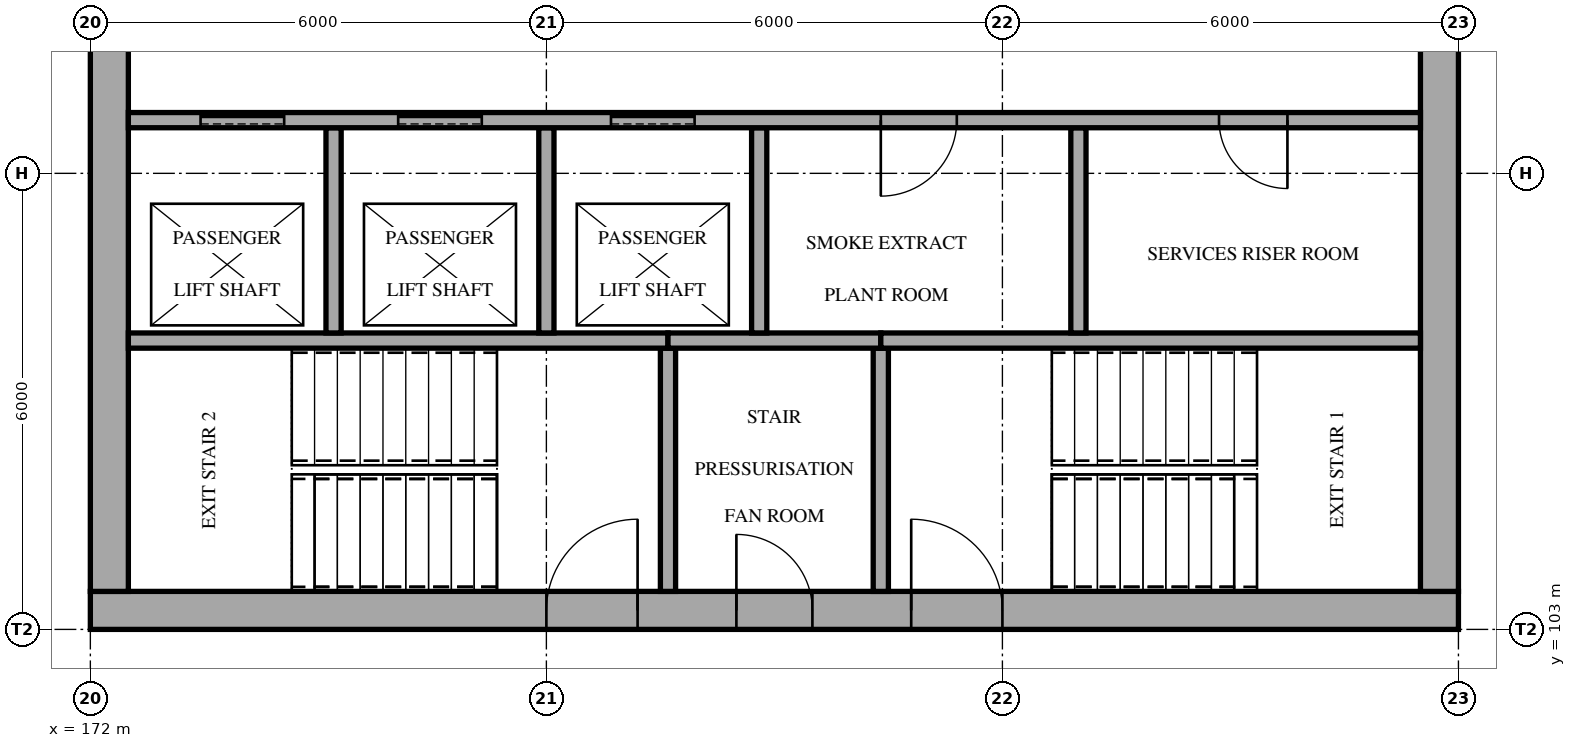
"""IFC4 building model, lengths in metres.
Left out: names, types, materials, properties, quantities, classifications, styles, units other than length and angle.
Written with IfcOpenShell. Run it as: python <this file> out.ifc"""

import sys

from ifc_helpers import new_model, si_unit, direction, frame, frame_2d, origin, place, context, subcontext, project, spatial, rectangle, extrude, element, fill, save


model = new_model("IFC4")
c1 = context("Model", 3, precision=1e-05, world=origin(), true_north=direction((0.0, 1.0)))
c2 = subcontext(c1, "Body", "Model", "MODEL_VIEW")
j1 = project(units=[si_unit("LENGTHUNIT", "METRE"), si_unit("PLANEANGLEUNIT", "RADIAN")], contexts=[c1])
p1 = place(None, origin())
s1 = spatial("IfcSite", under=j1, at=p1, CompositionType="ELEMENT")
p2 = place(p1, origin())
s2 = spatial("IfcBuilding", under=s1, at=p2, CompositionType="ELEMENT")
p3 = place(p2, frame((0.0, 0.0, -8.4)))
s3 = spatial("IfcBuildingStorey", under=s2, at=p3, CompositionType="ELEMENT", Elevation=-8.4)
p4 = place(p3, frame((172.0, 103.25, 0.0), z_axis=(0.0, 0.0, 1.0), x_axis=(1.0, 0.0, 0.0)))
e1 = element("IfcWall", 1, at=p4, inside=s3, PredefinedType="SHEAR", context=c2, shape_type="SweptSolid", body=[
    extrude(rectangle(XDim=18.0, YDim=0.5, at=frame_2d((9.0, 0.0))), origin(), (0.0, 0.0, 1.0), 4.2),
])
p5 = place(p4, frame((8.5, 0.0, 0.0)))
e2 = element("IfcOpeningElement", 2, at=p5, cuts=e1, PredefinedType="OPENING", context=c2, shape_type="SweptSolid", body=[
    extrude(rectangle(XDim=1.0, YDim=2.1, at=frame_2d((0.5, 1.05))), frame((0.0, 0.26, 0.0), z_axis=(0.0, -1.0, 0.0), x_axis=(1.0, 0.0, 0.0)), (0.0, 0.0, 1.0), 0.52),
])
p6 = place(p4, frame((6.0, 0.0, 0.0)))
e3 = element("IfcOpeningElement", 3, at=p6, cuts=e1, PredefinedType="OPENING", context=c2, shape_type="SweptSolid", body=[
    extrude(rectangle(XDim=1.2, YDim=2.1, at=frame_2d((0.6, 1.05))), frame((0.0, 0.26, 0.0), z_axis=(0.0, -1.0, 0.0), x_axis=(1.0, 0.0, 0.0)), (0.0, 0.0, 1.0), 0.52),
])
p7 = place(p4, frame((10.8, 0.0, 0.0)))
e4 = element("IfcOpeningElement", 4, at=p7, cuts=e1, PredefinedType="OPENING", context=c2, shape_type="SweptSolid", body=[
    extrude(rectangle(XDim=1.2, YDim=2.1, at=frame_2d((0.6, 1.05))), frame((0.0, 0.26, 0.0), z_axis=(0.0, -1.0, 0.0), x_axis=(1.0, 0.0, 0.0)), (0.0, 0.0, 1.0), 0.52),
])
p8 = place(p3, frame((172.25, 103.5, 0.0), z_axis=(0.0, 0.0, 1.0), x_axis=(0.0, 1.0, 0.0)))
e5 = element("IfcWall", 5, at=p8, inside=s3, PredefinedType="SHEAR", context=c2, shape_type="SweptSolid", body=[
    extrude(rectangle(XDim=17.0, YDim=0.5, at=frame_2d((8.5, 0.0))), origin(), (0.0, 0.0, 1.0), 4.2),
])
p9 = place(p8, frame((7.2, 0.0, 0.0)))
e6 = element("IfcOpeningElement", 6, at=p9, cuts=e5, PredefinedType="OPENING", context=c2, shape_type="SweptSolid", body=[
    extrude(rectangle(XDim=1.4, YDim=2.1, at=frame_2d((0.7, 1.05))), frame((0.0, 0.26, 0.0), z_axis=(0.0, -1.0, 0.0), x_axis=(1.0, 0.0, 0.0)), (0.0, 0.0, 1.0), 0.52),
])
p10 = place(p3, frame((189.75, 103.5, 0.0), z_axis=(0.0, 0.0, 1.0), x_axis=(0.0, 1.0, 0.0)))
e7 = element("IfcWall", 7, at=p10, inside=s3, PredefinedType="SHEAR", context=c2, shape_type="SweptSolid", body=[
    extrude(rectangle(XDim=17.0, YDim=0.5, at=frame_2d((8.5, 0.0))), origin(), (0.0, 0.0, 1.0), 4.2),
])
p11 = place(p10, frame((7.2, 0.0, 0.0)))
e8 = element("IfcOpeningElement", 8, at=p11, cuts=e7, PredefinedType="OPENING", context=c2, shape_type="SweptSolid", body=[
    extrude(rectangle(XDim=1.4, YDim=2.1, at=frame_2d((0.7, 1.05))), frame((0.0, 0.26, 0.0), z_axis=(0.0, -1.0, 0.0), x_axis=(1.0, 0.0, 0.0)), (0.0, 0.0, 1.0), 0.52),
])
for number, where, z_axis, x_axis in (
    (9, (179.6, 103.5, 0.0), (0.0, 0.0, 1.0), (0.0, 1.0, 0.0)),
    (10, (182.4, 103.5, 0.0), (0.0, 0.0, 1.0), (0.0, 1.0, 0.0)),
):
    element("IfcWall", number, at=place(p3, frame(where, z_axis=z_axis, x_axis=x_axis)), inside=s3, PredefinedType="SOLIDWALL", context=c2, shape_type="SweptSolid", body=[
        extrude(rectangle(XDim=3.2, YDim=0.2, at=frame_2d((1.6, 0.0))), origin(), (0.0, 0.0, 1.0), 3.85),
    ])
p12 = place(p3, frame((172.5, 106.8, 0.0), z_axis=(0.0, 0.0, 1.0), x_axis=(1.0, 0.0, 0.0)))
e11 = element("IfcWall", 11, at=p12, inside=s3, PredefinedType="SOLIDWALL", context=c2, shape_type="SweptSolid", body=[
    extrude(rectangle(XDim=7.1, YDim=0.2, at=frame_2d((3.55, 0.0))), origin(), (0.0, 0.0, 1.0), 3.85),
])
p13 = place(p3, frame((179.6, 106.8, 0.0), z_axis=(0.0, 0.0, 1.0), x_axis=(1.0, 0.0, 0.0)))
e12 = element("IfcWall", 12, at=p13, inside=s3, PredefinedType="SOLIDWALL", context=c2, shape_type="SweptSolid", body=[
    extrude(rectangle(XDim=2.8, YDim=0.2, at=frame_2d((1.4, 0.0))), origin(), (0.0, 0.0, 1.0), 3.85),
])
p14 = place(p3, frame((182.4, 106.8, 0.0), z_axis=(0.0, 0.0, 1.0), x_axis=(1.0, 0.0, 0.0)))
e13 = element("IfcWall", 13, at=p14, inside=s3, PredefinedType="SOLIDWALL", context=c2, shape_type="SweptSolid", body=[
    extrude(rectangle(XDim=7.1, YDim=0.2, at=frame_2d((3.55, 0.0))), origin(), (0.0, 0.0, 1.0), 3.85),
])
for number, where, z_axis, x_axis in (
    (14, (175.2, 106.9, 0.0), (0.0, 0.0, 1.0), (0.0, 1.0, 0.0)),
    (15, (178.0, 106.9, 0.0), (0.0, 0.0, 1.0), (0.0, 1.0, 0.0)),
    (16, (180.8, 106.9, 0.0), (0.0, 0.0, 1.0), (0.0, 1.0, 0.0)),
    (17, (185.0, 106.9, 0.0), (0.0, 0.0, 1.0), (0.0, 1.0, 0.0)),
):
    element("IfcWall", number, at=place(p3, frame(where, z_axis=z_axis, x_axis=x_axis)), inside=s3, PredefinedType="SOLIDWALL", context=c2, shape_type="SweptSolid", body=[
        extrude(rectangle(XDim=2.7, YDim=0.2, at=frame_2d((1.35, 0.0))), origin(), (0.0, 0.0, 1.0), 3.85),
    ])
p15 = place(p3, frame((172.5, 109.7, 0.0), z_axis=(0.0, 0.0, 1.0), x_axis=(1.0, 0.0, 0.0)))
e18 = element("IfcWall", 18, at=p15, inside=s3, PredefinedType="SOLIDWALL", context=c2, shape_type="SweptSolid", body=[
    extrude(rectangle(XDim=17.0, YDim=0.2, at=frame_2d((8.5, 0.0))), origin(), (0.0, 0.0, 1.0), 3.85),
])
p16 = place(p15, frame((0.95, 0.0, 0.0)))
e19 = element("IfcOpeningElement", 19, at=p16, cuts=e18, PredefinedType="OPENING", context=c2, shape_type="SweptSolid", body=[
    extrude(rectangle(XDim=1.1, YDim=2.1, at=frame_2d((0.55, 1.05))), frame((0.0, 0.11, 0.0), z_axis=(0.0, -1.0, 0.0), x_axis=(1.0, 0.0, 0.0)), (0.0, 0.0, 1.0), 0.22),
])
p17 = place(p15, frame((3.55, 0.0, 0.0)))
e20 = element("IfcOpeningElement", 20, at=p17, cuts=e18, PredefinedType="OPENING", context=c2, shape_type="SweptSolid", body=[
    extrude(rectangle(XDim=1.1, YDim=2.1, at=frame_2d((0.55, 1.05))), frame((0.0, 0.11, 0.0), z_axis=(0.0, -1.0, 0.0), x_axis=(1.0, 0.0, 0.0)), (0.0, 0.0, 1.0), 0.22),
])
p18 = place(p15, frame((6.35, 0.0, 0.0)))
e21 = element("IfcOpeningElement", 21, at=p18, cuts=e18, PredefinedType="OPENING", context=c2, shape_type="SweptSolid", body=[
    extrude(rectangle(XDim=1.1, YDim=2.1, at=frame_2d((0.55, 1.05))), frame((0.0, 0.11, 0.0), z_axis=(0.0, -1.0, 0.0), x_axis=(1.0, 0.0, 0.0)), (0.0, 0.0, 1.0), 0.22),
])
p19 = place(p15, frame((9.9, 0.0, 0.0)))
e22 = element("IfcOpeningElement", 22, at=p19, cuts=e18, PredefinedType="OPENING", context=c2, shape_type="SweptSolid", body=[
    extrude(rectangle(XDim=1.0, YDim=2.1, at=frame_2d((0.5, 1.05))), frame((0.0, 0.11, 0.0), z_axis=(0.0, -1.0, 0.0), x_axis=(1.0, 0.0, 0.0)), (0.0, 0.0, 1.0), 0.22),
])
p20 = place(p15, frame((14.35, 0.0, 0.0)))
e23 = element("IfcOpeningElement", 23, at=p20, cuts=e18, PredefinedType="OPENING", context=c2, shape_type="SweptSolid", body=[
    extrude(rectangle(XDim=0.9, YDim=2.1, at=frame_2d((0.45, 1.05))), frame((0.0, 0.11, 0.0), z_axis=(0.0, -1.0, 0.0), x_axis=(1.0, 0.0, 0.0)), (0.0, 0.0, 1.0), 0.22),
])
p21 = place(p5, origin())
e24 = element("IfcDoor", 24, at=p21, inside=s3, OperationType="SINGLE_SWING_LEFT", PredefinedType="DOOR", context=c2, shape_type="SweptSolid", body=[
    extrude(rectangle(XDim=1.0, YDim=2.1, at=frame_2d((0.5, 1.05))), frame((0.0, 0.025, 0.0), z_axis=(0.0, -1.0, 0.0), x_axis=(1.0, 0.0, 0.0)), (0.0, 0.0, 1.0), 0.05),
])
fill(e2, e24)
p22 = place(p16, origin())
e25 = element("IfcDoor", 25, at=p22, inside=s3, OperationType="SLIDING_TO_LEFT", PredefinedType="DOOR", context=c2, shape_type="SweptSolid", body=[
    extrude(rectangle(XDim=1.1, YDim=2.1, at=frame_2d((0.55, 1.05))), frame((0.0, 0.025, 0.0), z_axis=(0.0, -1.0, 0.0), x_axis=(1.0, 0.0, 0.0)), (0.0, 0.0, 1.0), 0.05),
])
fill(e19, e25)
p23 = place(p17, origin())
e26 = element("IfcDoor", 26, at=p23, inside=s3, OperationType="SLIDING_TO_LEFT", PredefinedType="DOOR", context=c2, shape_type="SweptSolid", body=[
    extrude(rectangle(XDim=1.1, YDim=2.1, at=frame_2d((0.55, 1.05))), frame((0.0, 0.025, 0.0), z_axis=(0.0, -1.0, 0.0), x_axis=(1.0, 0.0, 0.0)), (0.0, 0.0, 1.0), 0.05),
])
fill(e20, e26)
p24 = place(p18, origin())
e27 = element("IfcDoor", 27, at=p24, inside=s3, OperationType="SLIDING_TO_LEFT", PredefinedType="DOOR", context=c2, shape_type="SweptSolid", body=[
    extrude(rectangle(XDim=1.1, YDim=2.1, at=frame_2d((0.55, 1.05))), frame((0.0, 0.025, 0.0), z_axis=(0.0, -1.0, 0.0), x_axis=(1.0, 0.0, 0.0)), (0.0, 0.0, 1.0), 0.05),
])
fill(e21, e27)
p25 = place(p19, frame((1.0, 0.0, 0.0), z_axis=(0.0, 0.0, 1.0), x_axis=(-1.0, 0.0, 0.0)))
e28 = element("IfcDoor", 28, at=p25, inside=s3, OperationType="SINGLE_SWING_RIGHT", PredefinedType="DOOR", context=c2, shape_type="SweptSolid", body=[
    extrude(rectangle(XDim=1.0, YDim=2.1, at=frame_2d((0.5, 1.05))), frame((0.0, 0.025, 0.0), z_axis=(0.0, -1.0, 0.0), x_axis=(1.0, 0.0, 0.0)), (0.0, 0.0, 1.0), 0.05),
])
fill(e22, e28)
p26 = place(p20, frame((0.9, 0.0, 0.0), z_axis=(0.0, 0.0, 1.0), x_axis=(-1.0, 0.0, 0.0)))
e29 = element("IfcDoor", 29, at=p26, inside=s3, OperationType="SINGLE_SWING_LEFT", PredefinedType="DOOR", context=c2, shape_type="SweptSolid", body=[
    extrude(rectangle(XDim=0.9, YDim=2.1, at=frame_2d((0.45, 1.05))), frame((0.0, 0.025, 0.0), z_axis=(0.0, -1.0, 0.0), x_axis=(1.0, 0.0, 0.0)), (0.0, 0.0, 1.0), 0.05),
])
fill(e23, e29)
p27 = place(p6, origin())
e30 = element("IfcDoor", 30, at=p27, inside=s3, OperationType="SINGLE_SWING_RIGHT", PredefinedType="DOOR", context=c2, shape_type="SweptSolid", body=[
    extrude(rectangle(XDim=1.2, YDim=2.1, at=frame_2d((0.6, 1.05))), frame((0.0, 0.025, 0.0), z_axis=(0.0, -1.0, 0.0), x_axis=(1.0, 0.0, 0.0)), (0.0, 0.0, 1.0), 0.05),
])
fill(e3, e30)
p28 = place(p7, origin())
e31 = element("IfcDoor", 31, at=p28, inside=s3, OperationType="SINGLE_SWING_LEFT", PredefinedType="DOOR", context=c2, shape_type="SweptSolid", body=[
    extrude(rectangle(XDim=1.2, YDim=2.1, at=frame_2d((0.6, 1.05))), frame((0.0, 0.025, 0.0), z_axis=(0.0, -1.0, 0.0), x_axis=(1.0, 0.0, 0.0)), (0.0, 0.0, 1.0), 0.05),
])
fill(e4, e31)
save(model, sys.argv[1])
